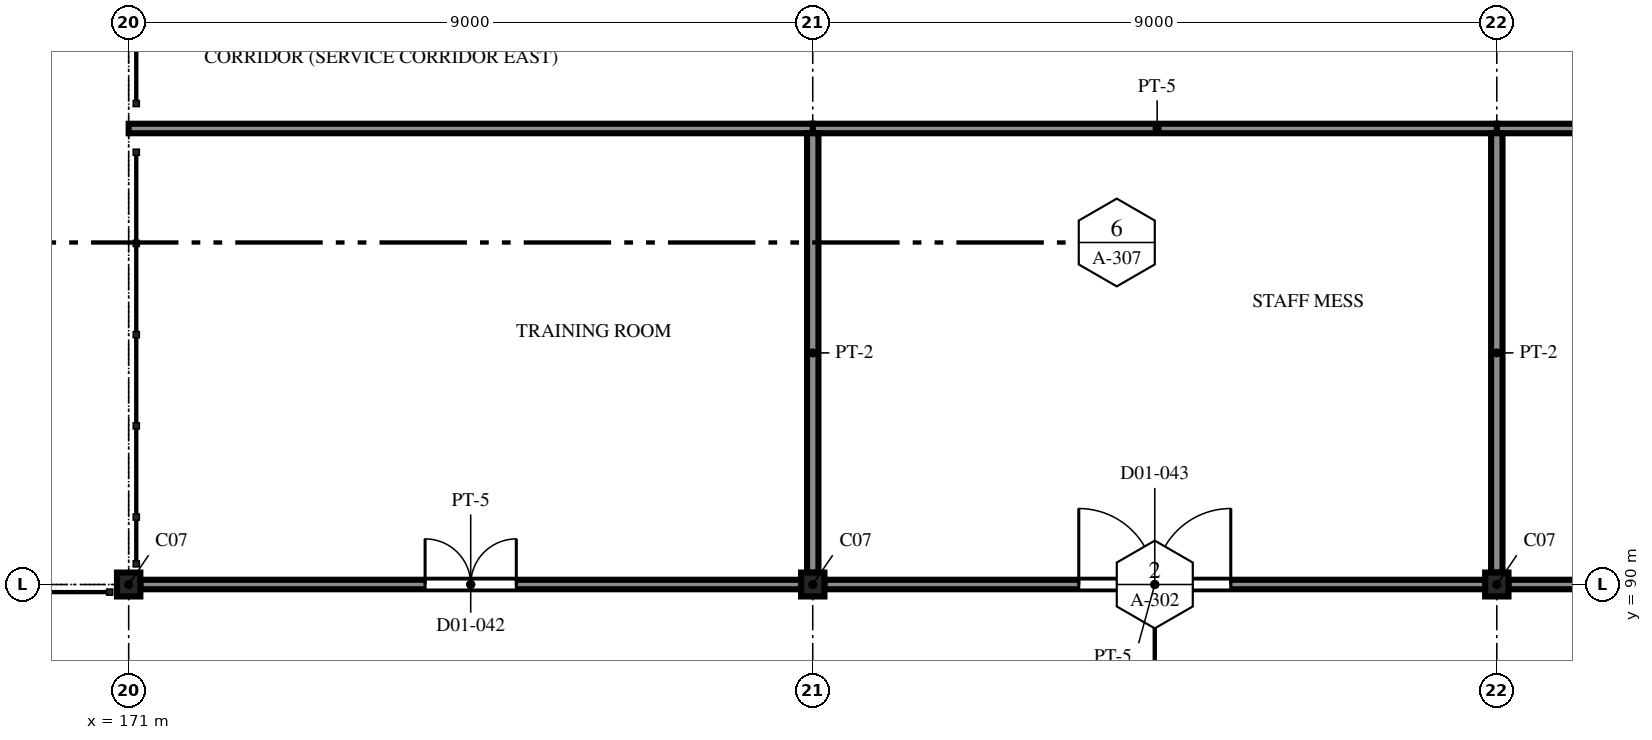
"""IFC4 building model, lengths in metres.
Left out: names, types, materials, properties, quantities, classifications, styles, units other than length and angle.
Written with IfcOpenShell. Run it as: python <this file> out.ifc"""

import sys

from ifc_helpers import new_model, si_unit, direction, frame, frame_2d, origin, origin_2d, place, context, subcontext, project, spatial, polyline, rectangle, i_section, outline, extrude, element, fill, save


model = new_model("IFC4")
c1 = context("Model", 3, precision=1e-05, world=origin(), true_north=direction((0.0, 1.0)))
c2 = subcontext(c1, "Body", "Model", "MODEL_VIEW")
j1 = project(units=[si_unit("LENGTHUNIT", "METRE"), si_unit("PLANEANGLEUNIT", "RADIAN")], contexts=[c1])
p1 = place(None, origin())
s1 = spatial("IfcSite", under=j1, at=p1, CompositionType="ELEMENT")
p2 = place(p1, origin())
s2 = spatial("IfcBuilding", under=s1, at=p2, CompositionType="ELEMENT")
p3 = place(p2, frame((0.0, 0.0, 7.5)))
s3 = spatial("IfcBuildingStorey", under=s2, at=p3, CompositionType="ELEMENT", Elevation=7.5)
for number, where, z_axis, x_axis in (
    (1, (171.0, 90.0, 0.0), (0.0, 0.0, 1.0), (1.0, 0.0, 0.0)),
    (2, (180.0, 90.0, 0.0), (0.0, 0.0, 1.0), (1.0, 0.0, 0.0)),
    (3, (189.0, 90.0, 0.0), (0.0, 0.0, 1.0), (1.0, 0.0, 0.0)),
):
    element("IfcColumn", number, at=place(p3, frame(where, z_axis=z_axis, x_axis=x_axis)), inside=s3, PredefinedType="COLUMN", context=c2, shape_type="SweptSolid", body=[
        extrude(i_section(OverallWidth=0.307, OverallDepth=0.314, WebThickness=0.012, FlangeThickness=0.019, FilletRadius=0.015, at=origin_2d()), origin(), (0.0, 0.0, 1.0), 4.2),
    ])
p4 = place(p3, frame((198.062, 96.0, 0.0), z_axis=(0.0, 0.0, 1.0), x_axis=(-1.0, 0.0, 0.0)))
e4 = element("IfcWall", 4, at=p4, inside=s3, PredefinedType="PARTITIONING", context=c2, shape_type="SweptSolid", body=[
    extrude(rectangle(XDim=9.062, YDim=0.125, at=frame_2d((4.531, 0.0))), origin(), (0.0, 0.0, 1.0), 3.307),
])
for number, where, z_axis, x_axis in (
    (5, (189.0, 96.0, 0.0), (0.0, 0.0, 1.0), (-1.0, 0.0, 0.0)),
    (6, (180.0, 96.0, 0.0), (0.0, 0.0, 1.0), (-1.0, 0.0, 0.0)),
):
    element("IfcWall", number, at=place(p3, frame(where, z_axis=z_axis, x_axis=x_axis)), inside=s3, PredefinedType="PARTITIONING", context=c2, shape_type="SweptSolid", body=[
        extrude(rectangle(XDim=9.0, YDim=0.125, at=frame_2d((4.5, 0.0))), origin(), (0.0, 0.0, 1.0), 3.307),
    ])
p5 = place(p3, frame((189.154, 90.0, 0.0), z_axis=(0.0, 0.0, 1.0), x_axis=(1.0, 0.0, 0.0)))
e7 = element("IfcWall", 7, at=p5, inside=s3, PredefinedType="PARTITIONING", context=c2, shape_type="SweptSolid", body=[
    extrude(rectangle(XDim=8.692, YDim=0.125, at=frame_2d((4.346, 0.0))), origin(), (0.0, 0.0, 1.0), 3.307),
])
p6 = place(p5, frame((3.746, 0.0, 0.0)))
e8 = element("IfcOpeningElement", 8, at=p6, cuts=e7, PredefinedType="OPENING", context=c2, shape_type="SweptSolid", body=[
    extrude(rectangle(XDim=1.2, YDim=2.1, at=frame_2d((0.6, 1.05))), frame((0.0, 0.073, 0.0), z_axis=(0.0, -1.0, 0.0), x_axis=(1.0, 0.0, 0.0)), (0.0, 0.0, 1.0), 0.145),
])
p7 = place(p3, frame((180.154, 90.0, 0.0), z_axis=(0.0, 0.0, 1.0), x_axis=(1.0, 0.0, 0.0)))
e9 = element("IfcWall", 9, at=p7, inside=s3, PredefinedType="PARTITIONING", context=c2, shape_type="SweptSolid", body=[
    extrude(rectangle(XDim=8.692, YDim=0.125, at=frame_2d((4.346, 0.0))), origin(), (0.0, 0.0, 1.0), 3.307),
])
p8 = place(p7, frame((3.346, 0.0, 0.0)))
e10 = element("IfcOpeningElement", 10, at=p8, cuts=e9, PredefinedType="OPENING", context=c2, shape_type="SweptSolid", body=[
    extrude(rectangle(XDim=2.0, YDim=2.4, at=frame_2d((1.0, 1.2))), frame((0.0, 0.073, 0.0), z_axis=(0.0, -1.0, 0.0), x_axis=(1.0, 0.0, 0.0)), (0.0, 0.0, 1.0), 0.145),
])
p9 = place(p3, frame((171.154, 90.0, 0.0), z_axis=(0.0, 0.0, 1.0), x_axis=(1.0, 0.0, 0.0)))
e11 = element("IfcWall", 11, at=p9, inside=s3, PredefinedType="PARTITIONING", context=c2, shape_type="SweptSolid", body=[
    extrude(rectangle(XDim=8.692, YDim=0.125, at=frame_2d((4.346, 0.0))), origin(), (0.0, 0.0, 1.0), 3.307),
])
p10 = place(p9, frame((3.746, 0.0, 0.0)))
e12 = element("IfcOpeningElement", 12, at=p10, cuts=e11, PredefinedType="OPENING", context=c2, shape_type="SweptSolid", body=[
    extrude(rectangle(XDim=1.2, YDim=2.1, at=frame_2d((0.6, 1.05))), frame((0.0, 0.073, 0.0), z_axis=(0.0, -1.0, 0.0), x_axis=(1.0, 0.0, 0.0)), (0.0, 0.0, 1.0), 0.145),
])
for number, where, z_axis, x_axis in (
    (13, (180.0, 95.938, 0.0), (0.0, 0.0, 1.0), (0.0, -1.0, 0.0)),
    (14, (189.0, 95.938, 0.0), (0.0, 0.0, 1.0), (0.0, -1.0, 0.0)),
):
    element("IfcWall", number, at=place(p3, frame(where, z_axis=z_axis, x_axis=x_axis)), inside=s3, PredefinedType="PARTITIONING", context=c2, shape_type="SweptSolid", body=[
        extrude(rectangle(XDim=5.78, YDim=0.15, at=frame_2d((2.89, 0.0))), origin(), (0.0, 0.0, 1.0), 3.307),
    ])
p11 = place(p10, origin())
e15 = element("IfcDoor", 15, at=p11, inside=s3, OperationType="DOUBLE_DOOR_SINGLE_SWING", PredefinedType="DOOR", context=c2, shape_type="SweptSolid", body=[
    extrude(outline(polyline([(0.0, 0.0), (0.07, 0.0), (0.07, 2.03), (1.13, 2.03), (1.13, 0.0), (1.2, 0.0), (1.2, 2.1), (0.0, 2.1), (0.0, 0.0)])), frame((0.0, 0.025, 0.0), z_axis=(0.0, -1.0, 0.0), x_axis=(1.0, 0.0, 0.0)), (0.0, 0.0, 1.0), 0.05),
    extrude(outline(polyline([(0.074, 0.01), (0.597, 0.01), (0.597, 2.026), (0.074, 2.026), (0.074, 0.01)]), holes=[polyline([(0.178, 0.373), (0.492, 0.373), (0.492, 1.784), (0.178, 1.784), (0.178, 0.373)])]), frame((0.0, 0.017, 0.0), z_axis=(0.0, -1.0, 0.0), x_axis=(1.0, 0.0, 0.0)), (0.0, 0.0, 1.0), 0.035),
    extrude(rectangle(XDim=0.314, YDim=1.411, at=frame_2d((0.335, 1.079))), frame((0.0, 0.009, 0.0), z_axis=(0.0, -1.0, 0.0), x_axis=(1.0, 0.0, 0.0)), (0.0, 0.0, 1.0), 0.017),
    extrude(outline(polyline([(0.603, 0.01), (1.126, 0.01), (1.126, 2.026), (0.603, 2.026), (0.603, 0.01)]), holes=[polyline([(0.708, 0.373), (1.021, 0.373), (1.021, 1.784), (0.708, 1.784), (0.708, 0.373)])]), frame((0.0, 0.017, 0.0), z_axis=(0.0, -1.0, 0.0), x_axis=(1.0, 0.0, 0.0)), (0.0, 0.0, 1.0), 0.035),
    extrude(rectangle(XDim=0.314, YDim=1.411, at=frame_2d((0.865, 1.079))), frame((0.0, 0.009, 0.0), z_axis=(0.0, -1.0, 0.0), x_axis=(1.0, 0.0, 0.0)), (0.0, 0.0, 1.0), 0.017),
])
fill(e12, e15)
p12 = place(p8, origin())
e16 = element("IfcDoor", 16, at=p12, inside=s3, OperationType="DOUBLE_DOOR_SINGLE_SWING", PredefinedType="DOOR", context=c2, shape_type="SweptSolid", body=[
    extrude(outline(polyline([(0.0, 0.0), (0.07, 0.0), (0.07, 2.33), (1.93, 2.33), (1.93, 0.0), (2.0, 0.0), (2.0, 2.4), (0.0, 2.4), (0.0, 0.0)])), frame((0.0, 0.025, 0.0), z_axis=(0.0, -1.0, 0.0), x_axis=(1.0, 0.0, 0.0)), (0.0, 0.0, 1.0), 0.05),
    extrude(outline(polyline([(0.074, 0.01), (0.997, 0.01), (0.997, 2.326), (0.074, 2.326), (0.074, 0.01)]), holes=[polyline([(0.194, 0.16), (0.877, 0.16), (0.877, 1.01), (0.194, 1.01), (0.194, 0.16)]), polyline([(0.385, 1.16), (0.686, 1.16), (0.686, 1.76), (0.385, 1.76), (0.385, 1.16)])]), frame((0.0, 0.017, 0.0), z_axis=(0.0, -1.0, 0.0), x_axis=(1.0, 0.0, 0.0)), (0.0, 0.0, 1.0), 0.035),
    extrude(rectangle(XDim=0.683, YDim=0.85, at=frame_2d((0.536, 0.585))), frame((0.0, 0.009, 0.0), z_axis=(0.0, -1.0, 0.0), x_axis=(1.0, 0.0, 0.0)), (0.0, 0.0, 1.0), 0.017),
    extrude(rectangle(XDim=0.3, YDim=0.6, at=frame_2d((0.536, 1.46))), frame((0.0, 0.006, 0.0), z_axis=(0.0, -1.0, 0.0), x_axis=(1.0, 0.0, 0.0)), (0.0, 0.0, 1.0), 0.012),
    extrude(outline(polyline([(1.003, 0.01), (1.926, 0.01), (1.926, 2.326), (1.003, 2.326), (1.003, 0.01)]), holes=[polyline([(1.123, 0.16), (1.806, 0.16), (1.806, 1.01), (1.123, 1.01), (1.123, 0.16)]), polyline([(1.314, 1.16), (1.615, 1.16), (1.615, 1.76), (1.314, 1.76), (1.314, 1.16)])]), frame((0.0, 0.017, 0.0), z_axis=(0.0, -1.0, 0.0), x_axis=(1.0, 0.0, 0.0)), (0.0, 0.0, 1.0), 0.035),
    extrude(rectangle(XDim=0.683, YDim=0.85, at=frame_2d((1.464, 0.585))), frame((0.0, 0.009, 0.0), z_axis=(0.0, -1.0, 0.0), x_axis=(1.0, 0.0, 0.0)), (0.0, 0.0, 1.0), 0.017),
    extrude(rectangle(XDim=0.3, YDim=0.6, at=frame_2d((1.464, 1.46))), frame((0.0, 0.006, 0.0), z_axis=(0.0, -1.0, 0.0), x_axis=(1.0, 0.0, 0.0)), (0.0, 0.0, 1.0), 0.012),
])
fill(e10, e16)
save(model, sys.argv[1])
